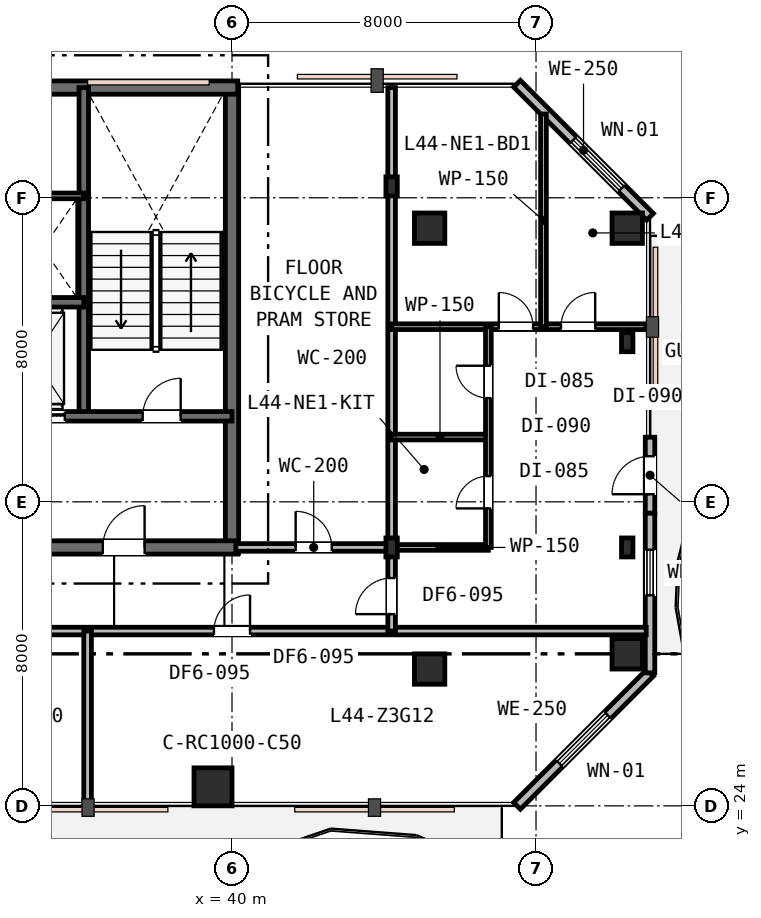
"""IFC4 building model, lengths in metres.
Left out: names, types, materials, properties, quantities, classifications, styles, units other than length and angle.
Written with IfcOpenShell. Run it as: python <this file> out.ifc"""

import sys

from ifc_helpers import new_model, si_unit, direction, frame, frame_2d, origin, origin_2d, place, context, subcontext, project, spatial, rectangle, i_section, extrude, element, fill, save


model = new_model("IFC4")
c1 = context("Model", 3, precision=1e-05, world=origin(), true_north=direction((0.0, 1.0)))
c2 = subcontext(c1, "Body", "Model", "MODEL_VIEW")
j1 = project(units=[si_unit("LENGTHUNIT", "METRE"), si_unit("PLANEANGLEUNIT", "RADIAN")], contexts=[c1])
p1 = place(None, origin())
s1 = spatial("IfcSite", under=j1, at=p1, CompositionType="ELEMENT")
p2 = place(p1, origin())
s2 = spatial("IfcBuilding", under=s1, at=p2, CompositionType="ELEMENT")
p3 = place(p2, frame((0.0, 0.0, 172.2)))
s3 = spatial("IfcBuildingStorey", under=s2, at=p3, CompositionType="ELEMENT", Elevation=172.2)
p4 = place(p3, frame((40.0, 30.65, 0.0), z_axis=(0.0, 0.0, 1.0), x_axis=(0.0, 1.0, 0.0)))
e1 = element("IfcWall", 1, at=p4, inside=s3, PredefinedType="SHEAR", context=c2, shape_type="SweptSolid", body=[
    extrude(rectangle(XDim=12.3, YDim=0.35, at=frame_2d((6.15, 0.0))), origin(), (0.0, 0.0, 1.0), 3.6),
])
p5 = place(p3, frame((15.85, 42.9, 0.0), z_axis=(0.0, 0.0, 1.0), x_axis=(1.0, 0.0, 0.0)))
e2 = element("IfcWall", 2, at=p5, inside=s3, PredefinedType="SHEAR", context=c2, shape_type="SweptSolid", body=[
    extrude(rectangle(XDim=24.3, YDim=0.35, at=frame_2d((12.15, 0.0))), origin(), (0.0, 0.0, 1.0), 3.6),
])
p6 = place(p3, frame((28.95, 30.8, 0.0), z_axis=(0.0, 0.0, 1.0), x_axis=(1.0, 0.0, 0.0)))
e3 = element("IfcWall", 3, at=p6, inside=s3, PredefinedType="SHEAR", context=c2, shape_type="SweptSolid", body=[
    extrude(rectangle(XDim=11.2, YDim=0.35, at=frame_2d((5.6, 0.0))), origin(), (0.0, 0.0, 1.0), 3.6),
])
p7 = place(p6, frame((7.65, 0.0, 0.0)))
e4 = element("IfcOpeningElement", 4, at=p7, cuts=e3, PredefinedType="OPENING", context=c2, shape_type="SweptSolid", body=[
    extrude(rectangle(XDim=1.1, YDim=2.15, at=frame_2d((0.55, 1.075))), frame((0.0, 0.185, 0.0), z_axis=(0.0, -1.0, 0.0), x_axis=(1.0, 0.0, 0.0)), (0.0, 0.0, 1.0), 0.37),
])
p8 = place(p3, frame((36.1, 34.25, 0.0), z_axis=(0.0, 0.0, 1.0), x_axis=(0.0, 1.0, 0.0)))
e5 = element("IfcWall", 5, at=p8, inside=s3, PredefinedType="SHEAR", context=c2, shape_type="SweptSolid", body=[
    extrude(rectangle(XDim=8.65, YDim=0.25, at=frame_2d((4.325, 0.0))), origin(), (0.0, 0.0, 1.0), 3.6),
])
p9 = place(p3, frame((33.95, 34.25, 0.0), z_axis=(0.0, 0.0, 1.0), x_axis=(1.0, 0.0, 0.0)))
e6 = element("IfcWall", 6, at=p9, inside=s3, PredefinedType="SHEAR", context=c2, shape_type="SweptSolid", body=[
    extrude(rectangle(XDim=6.05, YDim=0.25, at=frame_2d((3.025, 0.0))), origin(), (0.0, 0.0, 1.0), 3.6),
])
p10 = place(p9, frame((3.7, 0.0, 0.0)))
e7 = element("IfcOpeningElement", 7, at=p10, cuts=e6, PredefinedType="OPENING", context=c2, shape_type="SweptSolid", body=[
    extrude(rectangle(XDim=1.0, YDim=2.15, at=frame_2d((0.5, 1.075))), frame((0.0, 0.135, 0.0), z_axis=(0.0, -1.0, 0.0), x_axis=(1.0, 0.0, 0.0)), (0.0, 0.0, 1.0), 0.27),
])
p11 = place(p9, frame((0.55, 0.0, 0.0)))
e8 = element("IfcOpeningElement", 8, at=p11, cuts=e6, PredefinedType="OPENING", context=c2, shape_type="SweptSolid", body=[
    extrude(rectangle(XDim=1.1, YDim=2.15, at=frame_2d((0.55, 1.075))), frame((0.0, 0.135, 0.0), z_axis=(0.0, -1.0, 0.0), x_axis=(1.0, 0.0, 0.0)), (0.0, 0.0, 1.0), 0.27),
])
p12 = place(p3, frame((19.9, 37.25, 0.0), z_axis=(0.0, 0.0, 1.0), x_axis=(1.0, 0.0, 0.0)))
e9 = element("IfcWall", 9, at=p12, inside=s3, PredefinedType="SHEAR", context=c2, shape_type="SweptSolid", body=[
    extrude(rectangle(XDim=16.2, YDim=0.25, at=frame_2d((8.1, 0.0))), origin(), (0.0, 0.0, 1.0), 3.6),
])
p13 = place(p12, frame((12.55, 0.0, 0.0)))
e10 = element("IfcOpeningElement", 10, at=p13, cuts=e9, PredefinedType="OPENING", context=c2, shape_type="SweptSolid", body=[
    extrude(rectangle(XDim=0.9, YDim=2.15, at=frame_2d((0.45, 1.075))), frame((0.0, 0.135, 0.0), z_axis=(0.0, -1.0, 0.0), x_axis=(1.0, 0.0, 0.0)), (0.0, 0.0, 1.0), 0.27),
])
p14 = place(p12, frame((2.5, 0.0, 0.0)))
e11 = element("IfcOpeningElement", 11, at=p14, cuts=e9, PredefinedType="OPENING", context=c2, shape_type="SweptSolid", body=[
    extrude(rectangle(XDim=1.05, YDim=2.15, at=frame_2d((0.525, 1.075))), frame((0.0, 0.135, 0.0), z_axis=(0.0, -1.0, 0.0), x_axis=(1.0, 0.0, 0.0)), (0.0, 0.0, 1.0), 0.27),
])
p15 = place(p12, frame((4.4, 0.0, 0.0)))
e12 = element("IfcOpeningElement", 12, at=p15, cuts=e9, PredefinedType="OPENING", context=c2, shape_type="SweptSolid", body=[
    extrude(rectangle(XDim=1.05, YDim=2.15, at=frame_2d((0.525, 1.075))), frame((0.0, 0.135, 0.0), z_axis=(0.0, -1.0, 0.0), x_axis=(1.0, 0.0, 0.0)), (0.0, 0.0, 1.0), 0.27),
])
p16 = place(p12, frame((6.3, 0.0, 0.0)))
e13 = element("IfcOpeningElement", 13, at=p16, cuts=e9, PredefinedType="OPENING", context=c2, shape_type="SweptSolid", body=[
    extrude(rectangle(XDim=1.05, YDim=2.15, at=frame_2d((0.525, 1.075))), frame((0.0, 0.135, 0.0), z_axis=(0.0, -1.0, 0.0), x_axis=(1.0, 0.0, 0.0)), (0.0, 0.0, 1.0), 0.27),
])
p17 = place(p3, frame((39.5, 24.5, 0.0), z_axis=(0.0, 0.0, 1.0), x_axis=(1.0, 0.0, 0.0)))
e14 = element("IfcColumn", 14, at=p17, inside=s3, PredefinedType="COLUMN", context=c2, shape_type="SweptSolid", body=[
    extrude(rectangle(XDim=1.0, YDim=1.0, at=origin_2d()), origin(), (0.0, 0.0, 1.0), 3.6),
])
for number, where, z_axis, x_axis in (
    (15, (45.2, 27.6, 0.0), (0.0, 0.0, 1.0), (1.0, 0.0, 0.0)),
    (16, (45.2, 39.2, 0.0), (0.0, 0.0, 1.0), (1.0, 0.0, 0.0)),
    (17, (50.4, 28.0, 0.0), (0.0, 0.0, 1.0), (1.0, 0.0, 0.0)),
    (18, (50.4, 39.2, 0.0), (0.0, 0.0, 1.0), (1.0, 0.0, 0.0)),
):
    element("IfcColumn", number, at=place(p3, frame(where, z_axis=z_axis, x_axis=x_axis)), inside=s3, PredefinedType="COLUMN", context=c2, shape_type="SweptSolid", body=[
        extrude(rectangle(XDim=0.8, YDim=0.8, at=origin_2d()), origin(), (0.0, 0.0, 1.0), 3.6),
    ])
for number, where, z_axis, x_axis in (
    (19, (44.2, 30.8, 0.0), (0.0, 0.0, 1.0), (1.0, 0.0, 0.0)),
    (20, (44.2, 40.3, 0.0), (0.0, 0.0, 1.0), (1.0, 0.0, 0.0)),
    (21, (50.4, 30.8, 0.0), (0.0, 0.0, 1.0), (1.0, 0.0, 0.0)),
    (22, (50.4, 36.2, 0.0), (0.0, 0.0, 1.0), (1.0, 0.0, 0.0)),
):
    element("IfcColumn", number, at=place(p3, frame(where, z_axis=z_axis, x_axis=x_axis)), inside=s3, PredefinedType="COLUMN", context=c2, shape_type="SweptSolid", body=[
        extrude(i_section(OverallWidth=0.3, OverallDepth=0.5, WebThickness=0.015, FlangeThickness=0.028, FilletRadius=0.027, at=origin_2d()), origin(), (0.0, 0.0, 1.0), 3.6),
    ])
p18 = place(p3, frame((47.5, 24.0, 0.0), z_axis=(0.0, 0.0, 1.0), x_axis=(0.707106781187, 0.707106781187, 0.0)))
e23 = element("IfcWall", 23, at=p18, inside=s3, PredefinedType="STANDARD", context=c2, shape_type="SweptSolid", body=[
    extrude(rectangle(XDim=4.95, YDim=0.25, at=frame_2d((2.475, 0.0))), origin(), (0.0, 0.0, 1.0), 3.33),
])
p19 = place(p18, frame((1.575, 0.0, 0.75)))
e24 = element("IfcOpeningElement", 24, at=p19, cuts=e23, PredefinedType="OPENING", context=c2, shape_type="SweptSolid", body=[
    extrude(rectangle(XDim=1.8, YDim=1.85, at=frame_2d((0.9, 0.925))), frame((0.0, 0.135, 0.0), z_axis=(0.0, -1.0, 0.0), x_axis=(1.0, 0.0, 0.0)), (0.0, 0.0, 1.0), 0.27),
])
p20 = place(p3, frame((51.0, 31.7, 0.0), z_axis=(0.0, 0.0, 1.0), x_axis=(0.0, 1.0, 0.0)))
e25 = element("IfcWall", 25, at=p20, inside=s3, PredefinedType="STANDARD", context=c2, shape_type="SweptSolid", body=[
    extrude(rectangle(XDim=2.0, YDim=0.25, at=frame_2d((1.0, 0.0))), origin(), (0.0, 0.0, 1.0), 3.33),
])
p21 = place(p20, frame((0.5, 0.0, 0.0)))
e26 = element("IfcOpeningElement", 26, at=p21, cuts=e25, PredefinedType="OPENING", context=c2, shape_type="SweptSolid", body=[
    extrude(rectangle(XDim=1.0, YDim=2.15, at=frame_2d((0.5, 1.075))), frame((0.0, 0.135, 0.0), z_axis=(0.0, -1.0, 0.0), x_axis=(1.0, 0.0, 0.0)), (0.0, 0.0, 1.0), 0.27),
])
p22 = place(p3, frame((51.0, 27.5, 0.0), z_axis=(0.0, 0.0, 1.0), x_axis=(0.0, 1.0, 0.0)))
e27 = element("IfcWall", 27, at=p22, inside=s3, PredefinedType="STANDARD", context=c2, shape_type="SweptSolid", body=[
    extrude(rectangle(XDim=4.2, YDim=0.25, at=frame_2d((2.1, 0.0))), origin(), (0.0, 0.0, 1.0), 3.33),
])
p23 = place(p22, frame((2.04, 0.0, 0.85)))
e28 = element("IfcOpeningElement", 28, at=p23, cuts=e27, PredefinedType="OPENING", context=c2, shape_type="SweptSolid", body=[
    extrude(rectangle(XDim=1.2, YDim=1.6, at=frame_2d((0.6, 0.8))), frame((0.0, 0.135, 0.0), z_axis=(0.0, -1.0, 0.0), x_axis=(1.0, 0.0, 0.0)), (0.0, 0.0, 1.0), 0.27),
])
p24 = place(p3, frame((51.0, 39.5, 0.0), z_axis=(0.0, 0.0, 1.0), x_axis=(-0.707106781187, 0.707106781187, 0.0)))
e29 = element("IfcWall", 29, at=p24, inside=s3, PredefinedType="STANDARD", context=c2, shape_type="SweptSolid", body=[
    extrude(rectangle(XDim=4.95, YDim=0.25, at=frame_2d((2.475, 0.0))), origin(), (0.0, 0.0, 1.0), 3.33),
])
p25 = place(p24, frame((1.057, 0.0, 0.75)))
e30 = element("IfcOpeningElement", 30, at=p25, cuts=e29, PredefinedType="OPENING", context=c2, shape_type="SweptSolid", body=[
    extrude(rectangle(XDim=1.8, YDim=1.85, at=frame_2d((0.9, 0.925))), frame((0.0, 0.135, 0.0), z_axis=(0.0, -1.0, 0.0), x_axis=(1.0, 0.0, 0.0)), (0.0, 0.0, 1.0), 0.27),
])
p26 = place(p3, frame((34.05, 40.05, 0.0), z_axis=(0.0, 0.0, 1.0), x_axis=(1.0, 0.0, 0.0)))
e31 = element("IfcWall", 31, at=p26, inside=s3, PredefinedType="PARTITIONING", context=c2, shape_type="SweptSolid", body=[
    extrude(rectangle(XDim=2.05, YDim=0.15, at=frame_2d((1.025, 0.0))), origin(), (0.0, 0.0, 1.0), 3.33),
])
p27 = place(p3, frame((13.6, 28.6, 0.0), z_axis=(0.0, 0.0, 1.0), x_axis=(1.0, 0.0, 0.0)))
e32 = element("IfcWall", 32, at=p27, inside=s3, PredefinedType="PARTITIONING", context=c2, shape_type="SweptSolid", body=[
    extrude(rectangle(XDim=37.3, YDim=0.2, at=frame_2d((18.65, 0.0))), origin(), (0.0, 0.0, 1.0), 2.92),
])
p28 = place(p27, frame((16.025, 0.0, 0.0)))
e33 = element("IfcOpeningElement", 33, at=p28, cuts=e32, PredefinedType="OPENING", context=c2, shape_type="SweptSolid", body=[
    extrude(rectangle(XDim=0.95, YDim=2.15, at=frame_2d((0.475, 1.075))), frame((0.0, 0.11, 0.0), z_axis=(0.0, -1.0, 0.0), x_axis=(1.0, 0.0, 0.0)), (0.0, 0.0, 1.0), 0.22),
])
p29 = place(p27, frame((25.925, 0.0, 0.0)))
e34 = element("IfcOpeningElement", 34, at=p29, cuts=e32, PredefinedType="OPENING", context=c2, shape_type="SweptSolid", body=[
    extrude(rectangle(XDim=0.95, YDim=2.15, at=frame_2d((0.475, 1.075))), frame((0.0, 0.11, 0.0), z_axis=(0.0, -1.0, 0.0), x_axis=(1.0, 0.0, 0.0)), (0.0, 0.0, 1.0), 0.22),
])
p30 = place(p3, frame((40.1, 30.8, 0.0), z_axis=(0.0, 0.0, 1.0), x_axis=(1.0, 0.0, 0.0)))
e35 = element("IfcWall", 35, at=p30, inside=s3, PredefinedType="PARTITIONING", context=c2, shape_type="SweptSolid", body=[
    extrude(rectangle(XDim=4.1, YDim=0.2, at=frame_2d((2.05, 0.0))), origin(), (0.0, 0.0, 1.0), 2.92),
])
p31 = place(p30, frame((1.575, 0.0, 0.0)))
e36 = element("IfcOpeningElement", 36, at=p31, cuts=e35, PredefinedType="OPENING", context=c2, shape_type="SweptSolid", body=[
    extrude(rectangle(XDim=0.95, YDim=2.15, at=frame_2d((0.475, 1.075))), frame((0.0, 0.11, 0.0), z_axis=(0.0, -1.0, 0.0), x_axis=(1.0, 0.0, 0.0)), (0.0, 0.0, 1.0), 0.22),
])
p32 = place(p3, frame((44.2, 28.6, 0.0), z_axis=(0.0, 0.0, 1.0), x_axis=(0.0, 1.0, 0.0)))
e37 = element("IfcWall", 37, at=p32, inside=s3, PredefinedType="PARTITIONING", context=c2, shape_type="SweptSolid", body=[
    extrude(rectangle(XDim=14.3, YDim=0.2, at=frame_2d((7.15, 0.0))), origin(), (0.0, 0.0, 1.0), 2.92),
])
p33 = place(p32, frame((0.445, 0.0, 0.0)))
e38 = element("IfcOpeningElement", 38, at=p33, cuts=e37, PredefinedType="OPENING", context=c2, shape_type="SweptSolid", body=[
    extrude(rectangle(XDim=0.95, YDim=2.15, at=frame_2d((0.475, 1.075))), frame((0.0, 0.11, 0.0), z_axis=(0.0, -1.0, 0.0), x_axis=(1.0, 0.0, 0.0)), (0.0, 0.0, 1.0), 0.22),
])
for number, where, z_axis, x_axis in (
    (39, (44.2, 30.8, 0.0), (0.0, 0.0, 1.0), (1.0, 0.0, 0.0)),
    (40, (44.2, 33.704, 0.0), (0.0, 0.0, 1.0), (1.0, 0.0, 0.0)),
):
    element("IfcWall", number, at=place(p3, frame(where, z_axis=z_axis, x_axis=x_axis)), inside=s3, PredefinedType="PARTITIONING", context=c2, shape_type="SweptSolid", body=[
        extrude(rectangle(XDim=2.546, YDim=0.15, at=frame_2d((1.273, 0.0))), origin(), (0.0, 0.0, 1.0), 2.92),
    ])
p34 = place(p3, frame((44.2, 36.608, 0.0), z_axis=(0.0, 0.0, 1.0), x_axis=(1.0, 0.0, 0.0)))
e41 = element("IfcWall", 41, at=p34, inside=s3, PredefinedType="PARTITIONING", context=c2, shape_type="SweptSolid", body=[
    extrude(rectangle(XDim=6.7, YDim=0.15, at=frame_2d((3.35, 0.0))), origin(), (0.0, 0.0, 1.0), 2.92),
])
p35 = place(p34, frame((2.821, 0.0, 0.0)))
e42 = element("IfcOpeningElement", 42, at=p35, cuts=e41, PredefinedType="OPENING", context=c2, shape_type="SweptSolid", body=[
    extrude(rectangle(XDim=0.9, YDim=2.15, at=frame_2d((0.45, 1.075))), frame((0.0, 0.085, 0.0), z_axis=(0.0, -1.0, 0.0), x_axis=(1.0, 0.0, 0.0)), (0.0, 0.0, 1.0), 0.17),
])
p36 = place(p34, frame((4.457, 0.0, 0.0)))
e43 = element("IfcOpeningElement", 43, at=p36, cuts=e41, PredefinedType="OPENING", context=c2, shape_type="SweptSolid", body=[
    extrude(rectangle(XDim=0.9, YDim=2.15, at=frame_2d((0.45, 1.075))), frame((0.0, 0.085, 0.0), z_axis=(0.0, -1.0, 0.0), x_axis=(1.0, 0.0, 0.0)), (0.0, 0.0, 1.0), 0.17),
])
p37 = place(p3, frame((46.746, 30.8, 0.0), z_axis=(0.0, 0.0, 1.0), x_axis=(0.0, 1.0, 0.0)))
e44 = element("IfcWall", 44, at=p37, inside=s3, PredefinedType="PARTITIONING", context=c2, shape_type="SweptSolid", body=[
    extrude(rectangle(XDim=5.808, YDim=0.15, at=frame_2d((2.904, 0.0))), origin(), (0.0, 0.0, 1.0), 2.92),
])
p38 = place(p37, frame((1.027, 0.0, 0.0)))
e45 = element("IfcOpeningElement", 45, at=p38, cuts=e44, PredefinedType="OPENING", context=c2, shape_type="SweptSolid", body=[
    extrude(rectangle(XDim=0.85, YDim=2.15, at=frame_2d((0.425, 1.075))), frame((0.0, 0.085, 0.0), z_axis=(0.0, -1.0, 0.0), x_axis=(1.0, 0.0, 0.0)), (0.0, 0.0, 1.0), 0.17),
])
p39 = place(p37, frame((3.931, 0.0, 0.0)))
e46 = element("IfcOpeningElement", 46, at=p39, cuts=e44, PredefinedType="OPENING", context=c2, shape_type="SweptSolid", body=[
    extrude(rectangle(XDim=0.85, YDim=2.15, at=frame_2d((0.425, 1.075))), frame((0.0, 0.085, 0.0), z_axis=(0.0, -1.0, 0.0), x_axis=(1.0, 0.0, 0.0)), (0.0, 0.0, 1.0), 0.17),
])
p40 = place(p3, frame((48.196, 36.608, 0.0), z_axis=(0.0, 0.0, 1.0), x_axis=(0.0, 1.0, 0.0)))
e47 = element("IfcWall", 47, at=p40, inside=s3, PredefinedType="PARTITIONING", context=c2, shape_type="SweptSolid", body=[
    extrude(rectangle(XDim=5.596, YDim=0.15, at=frame_2d((2.798, 0.0))), origin(), (0.0, 0.0, 1.0), 3.02),
])
p41 = place(p3, frame((36.2, 24.1, 0.0), z_axis=(0.0, 0.0, 1.0), x_axis=(0.0, 1.0, 0.0)))
e48 = element("IfcWall", 48, at=p41, inside=s3, PredefinedType="PARTITIONING", context=c2, shape_type="SweptSolid", body=[
    extrude(rectangle(XDim=4.5, YDim=0.2, at=frame_2d((2.25, 0.0))), origin(), (0.0, 0.0, 1.0), 3.02),
])
p42 = place(p19, origin())
e49 = element("IfcWindow", 49, at=p42, inside=s3, PartitioningType="SINGLE_PANEL", PredefinedType="WINDOW", context=c2, shape_type="SweptSolid", body=[
    extrude(rectangle(XDim=1.8, YDim=1.85, at=frame_2d((0.9, 0.925))), frame((0.0, 0.03, 0.0), z_axis=(0.0, -1.0, 0.0), x_axis=(1.0, 0.0, 0.0)), (0.0, 0.0, 1.0), 0.06),
])
fill(e24, e49)
p43 = place(p21, origin())
e50 = element("IfcDoor", 50, at=p43, inside=s3, OperationType="SINGLE_SWING_LEFT", PredefinedType="DOOR", context=c2, shape_type="SweptSolid", body=[
    extrude(rectangle(XDim=1.0, YDim=2.15, at=frame_2d((0.5, 1.075))), frame((0.0, 0.025, 0.0), z_axis=(0.0, -1.0, 0.0), x_axis=(1.0, 0.0, 0.0)), (0.0, 0.0, 1.0), 0.05),
])
fill(e26, e50)
p44 = place(p23, origin())
e51 = element("IfcWindow", 51, at=p44, inside=s3, PartitioningType="SINGLE_PANEL", PredefinedType="WINDOW", context=c2, shape_type="SweptSolid", body=[
    extrude(rectangle(XDim=1.2, YDim=1.6, at=frame_2d((0.6, 0.8))), frame((0.0, 0.03, 0.0), z_axis=(0.0, -1.0, 0.0), x_axis=(1.0, 0.0, 0.0)), (0.0, 0.0, 1.0), 0.06),
])
fill(e28, e51)
p45 = place(p25, origin())
e52 = element("IfcWindow", 52, at=p45, inside=s3, PartitioningType="SINGLE_PANEL", PredefinedType="WINDOW", context=c2, shape_type="SweptSolid", body=[
    extrude(rectangle(XDim=1.8, YDim=1.85, at=frame_2d((0.9, 0.925))), frame((0.0, 0.03, 0.0), z_axis=(0.0, -1.0, 0.0), x_axis=(1.0, 0.0, 0.0)), (0.0, 0.0, 1.0), 0.06),
])
fill(e30, e52)
p46 = place(p10, origin())
e53 = element("IfcDoor", 53, at=p46, inside=s3, OperationType="SINGLE_SWING_RIGHT", PredefinedType="DOOR", context=c2, shape_type="SweptSolid", body=[
    extrude(rectangle(XDim=1.0, YDim=2.15, at=frame_2d((0.5, 1.075))), frame((0.0, 0.025, 0.0), z_axis=(0.0, -1.0, 0.0), x_axis=(1.0, 0.0, 0.0)), (0.0, 0.0, 1.0), 0.05),
])
fill(e7, e53)
p47 = place(p7, origin())
e54 = element("IfcDoor", 54, at=p47, inside=s3, OperationType="SINGLE_SWING_RIGHT", PredefinedType="DOOR", context=c2, shape_type="SweptSolid", body=[
    extrude(rectangle(XDim=1.1, YDim=2.15, at=frame_2d((0.55, 1.075))), frame((0.0, 0.025, 0.0), z_axis=(0.0, -1.0, 0.0), x_axis=(1.0, 0.0, 0.0)), (0.0, 0.0, 1.0), 0.05),
])
fill(e4, e54)
p48 = place(p31, origin())
e55 = element("IfcDoor", 55, at=p48, inside=s3, OperationType="SINGLE_SWING_LEFT", PredefinedType="DOOR", context=c2, shape_type="SweptSolid", body=[
    extrude(rectangle(XDim=0.95, YDim=2.15, at=frame_2d((0.475, 1.075))), frame((0.0, 0.025, 0.0), z_axis=(0.0, -1.0, 0.0), x_axis=(1.0, 0.0, 0.0)), (0.0, 0.0, 1.0), 0.05),
])
fill(e36, e55)
p49 = place(p33, origin())
e56 = element("IfcDoor", 56, at=p49, inside=s3, OperationType="SINGLE_SWING_LEFT", PredefinedType="DOOR", context=c2, shape_type="SweptSolid", body=[
    extrude(rectangle(XDim=0.95, YDim=2.15, at=frame_2d((0.475, 1.075))), frame((0.0, 0.025, 0.0), z_axis=(0.0, -1.0, 0.0), x_axis=(1.0, 0.0, 0.0)), (0.0, 0.0, 1.0), 0.05),
])
fill(e38, e56)
p50 = place(p38, origin())
e57 = element("IfcDoor", 57, at=p50, inside=s3, OperationType="SINGLE_SWING_LEFT", PredefinedType="DOOR", context=c2, shape_type="SweptSolid", body=[
    extrude(rectangle(XDim=0.85, YDim=2.15, at=frame_2d((0.425, 1.075))), frame((0.0, 0.025, 0.0), z_axis=(0.0, -1.0, 0.0), x_axis=(1.0, 0.0, 0.0)), (0.0, 0.0, 1.0), 0.05),
])
fill(e45, e57)
p51 = place(p39, origin())
e58 = element("IfcDoor", 58, at=p51, inside=s3, OperationType="SINGLE_SWING_RIGHT", PredefinedType="DOOR", context=c2, shape_type="SweptSolid", body=[
    extrude(rectangle(XDim=0.85, YDim=2.15, at=frame_2d((0.425, 1.075))), frame((0.0, 0.025, 0.0), z_axis=(0.0, -1.0, 0.0), x_axis=(1.0, 0.0, 0.0)), (0.0, 0.0, 1.0), 0.05),
])
fill(e46, e58)
p52 = place(p35, origin())
e59 = element("IfcDoor", 59, at=p52, inside=s3, OperationType="SINGLE_SWING_LEFT", PredefinedType="DOOR", context=c2, shape_type="SweptSolid", body=[
    extrude(rectangle(XDim=0.9, YDim=2.15, at=frame_2d((0.45, 1.075))), frame((0.0, 0.025, 0.0), z_axis=(0.0, -1.0, 0.0), x_axis=(1.0, 0.0, 0.0)), (0.0, 0.0, 1.0), 0.05),
])
fill(e42, e59)
p53 = place(p36, origin())
e60 = element("IfcDoor", 60, at=p53, inside=s3, OperationType="SINGLE_SWING_RIGHT", PredefinedType="DOOR", context=c2, shape_type="SweptSolid", body=[
    extrude(rectangle(XDim=0.9, YDim=2.15, at=frame_2d((0.45, 1.075))), frame((0.0, 0.025, 0.0), z_axis=(0.0, -1.0, 0.0), x_axis=(1.0, 0.0, 0.0)), (0.0, 0.0, 1.0), 0.05),
])
fill(e43, e60)
p54 = place(p29, origin())
e61 = element("IfcDoor", 61, at=p54, inside=s3, OperationType="SINGLE_SWING_RIGHT", PredefinedType="DOOR", context=c2, shape_type="SweptSolid", body=[
    extrude(rectangle(XDim=0.95, YDim=2.15, at=frame_2d((0.475, 1.075))), frame((0.0, 0.025, 0.0), z_axis=(0.0, -1.0, 0.0), x_axis=(1.0, 0.0, 0.0)), (0.0, 0.0, 1.0), 0.05),
])
fill(e34, e61)
p55 = place(p11, origin())
e62 = element("IfcDoor", 62, at=p55, inside=s3, OperationType="DOUBLE_DOOR_SLIDING", PredefinedType="DOOR", context=c2, shape_type="SweptSolid", body=[
    extrude(rectangle(XDim=1.1, YDim=2.15, at=frame_2d((0.55, 1.075))), frame((0.0, 0.025, 0.0), z_axis=(0.0, -1.0, 0.0), x_axis=(1.0, 0.0, 0.0)), (0.0, 0.0, 1.0), 0.05),
])
fill(e8, e62)
save(model, sys.argv[1])
